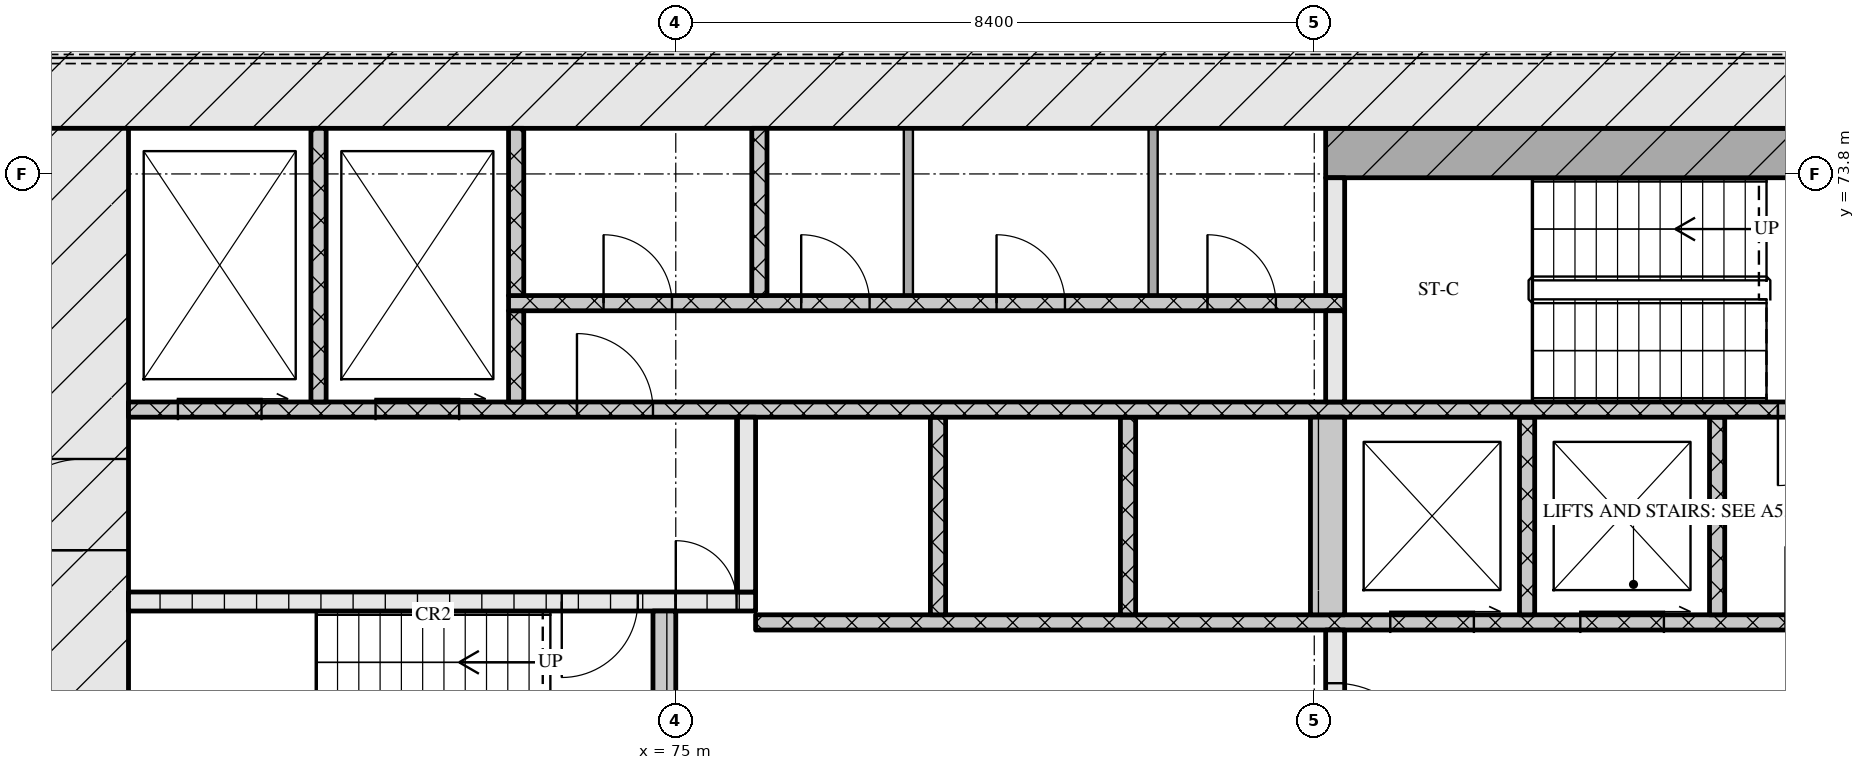
"""IFC4 building model, lengths in metres.
Left out: names, types, materials, properties, quantities, classifications, styles, units other than length and angle.
Written with IfcOpenShell. Run it as: python <this file> out.ifc"""

import sys

from ifc_helpers import new_model, si_unit, direction, frame, frame_2d, origin, place, context, subcontext, project, spatial, rectangle, extrude, element, fill, save


model = new_model("IFC4")
c1 = context("Model", 3, precision=1e-05, world=origin(), true_north=direction((0.0, 1.0)))
c2 = subcontext(c1, "Body", "Model", "MODEL_VIEW")
j1 = project(units=[si_unit("LENGTHUNIT", "METRE"), si_unit("PLANEANGLEUNIT", "RADIAN")], contexts=[c1])
p1 = place(None, origin())
s1 = spatial("IfcSite", under=j1, at=p1, CompositionType="ELEMENT")
p2 = place(p1, origin())
s2 = spatial("IfcBuilding", under=s1, at=p2, CompositionType="ELEMENT")
p3 = place(p2, frame((0.0, 0.0, 28.2)))
s3 = spatial("IfcBuildingStorey", under=s2, at=p3, CompositionType="ELEMENT", Elevation=28.2)
p4 = place(p3, frame((66.6, 75.0, 0.0), z_axis=(0.0, 0.0, 1.0), x_axis=(1.0, 0.0, 0.0)))
e1 = element("IfcWall", 1, at=p4, inside=s3, PredefinedType="SOLIDWALL", context=c2, shape_type="SweptSolid", body=[
    extrude(rectangle(XDim=42.0, YDim=1.2, at=frame_2d((21.0, 0.0))), origin(), (0.0, 0.0, 1.0), 4.2),
])
p5 = place(p3, frame((67.2, 62.4, 0.0), z_axis=(0.0, 0.0, 1.0), x_axis=(0.0, 1.0, 0.0)))
e2 = element("IfcWall", 2, at=p5, inside=s3, PredefinedType="SOLIDWALL", context=c2, shape_type="SweptSolid", body=[
    extrude(rectangle(XDim=12.0, YDim=1.2, at=frame_2d((6.0, 0.0))), origin(), (0.0, 0.0, 1.0), 4.2),
])
p6 = place(p5, frame((6.45, 0.0, 0.0)))
e3 = element("IfcOpeningElement", 3, at=p6, cuts=e2, PredefinedType="OPENING", context=c2, shape_type="SweptSolid", body=[
    extrude(rectangle(XDim=1.2, YDim=2.1, at=frame_2d((0.6, 1.05))), frame((0.0, 0.61, 0.0), z_axis=(0.0, -1.0, 0.0), x_axis=(1.0, 0.0, 0.0)), (0.0, 0.0, 1.0), 1.22),
])
p7 = place(p3, frame((74.85, 65.2, 0.0), z_axis=(0.0, 0.0, 1.0), x_axis=(0.0, 1.0, 0.0)))
e4 = element("IfcWall", 4, at=p7, inside=s3, PredefinedType="SOLIDWALL", context=c2, shape_type="SweptSolid", body=[
    extrude(rectangle(XDim=2.85, YDim=0.3, at=frame_2d((1.425, 0.0))), origin(), (0.0, 0.0, 1.0), 4.2),
])
p8 = place(p3, frame((83.675, 65.2, 0.0), z_axis=(0.0, 0.0, 1.0), x_axis=(0.0, 1.0, 0.0)))
e5 = element("IfcWall", 5, at=p8, inside=s3, PredefinedType="SOLIDWALL", context=c2, shape_type="SweptSolid", body=[
    extrude(rectangle(XDim=2.6, YDim=0.25, at=frame_2d((1.3, 0.0))), origin(), (0.0, 0.0, 1.0), 4.2),
])
p9 = place(p8, frame((0.7, 0.0, 0.0)))
e6 = element("IfcOpeningElement", 6, at=p9, cuts=e5, PredefinedType="OPENING", context=c2, shape_type="SweptSolid", body=[
    extrude(rectangle(XDim=1.2, YDim=2.1, at=frame_2d((0.6, 1.05))), frame((0.0, 0.135, 0.0), z_axis=(0.0, -1.0, 0.0), x_axis=(1.0, 0.0, 0.0)), (0.0, 0.0, 1.0), 0.27),
])
p10 = place(p3, frame((76.05, 67.9, 0.0), z_axis=(0.0, 0.0, 1.0), x_axis=(1.0, 0.0, 0.0)))
e7 = element("IfcWall", 7, at=p10, inside=s3, PredefinedType="SOLIDWALL", context=c2, shape_type="SweptSolid", body=[
    extrude(rectangle(XDim=23.1, YDim=0.2, at=frame_2d((11.55, 0.0))), origin(), (0.0, 0.0, 1.0), 4.2),
])
p11 = place(p10, frame((8.35, 0.0, 0.0)))
e8 = element("IfcOpeningElement", 8, at=p11, cuts=e7, PredefinedType="OPENING", context=c2, shape_type="SweptSolid", body=[
    extrude(rectangle(XDim=1.1, YDim=2.1, at=frame_2d((0.55, 1.05))), frame((0.0, 0.11, 0.0), z_axis=(0.0, -1.0, 0.0), x_axis=(1.0, 0.0, 0.0)), (0.0, 0.0, 1.0), 0.22),
])
p12 = place(p10, frame((10.85, 0.0, 0.0)))
e9 = element("IfcOpeningElement", 9, at=p12, cuts=e7, PredefinedType="OPENING", context=c2, shape_type="SweptSolid", body=[
    extrude(rectangle(XDim=1.1, YDim=2.1, at=frame_2d((0.55, 1.05))), frame((0.0, 0.11, 0.0), z_axis=(0.0, -1.0, 0.0), x_axis=(1.0, 0.0, 0.0)), (0.0, 0.0, 1.0), 0.22),
])
p13 = place(p10, frame((13.55, 0.0, 0.0)))
e10 = element("IfcOpeningElement", 10, at=p13, cuts=e7, PredefinedType="OPENING", context=c2, shape_type="SweptSolid", body=[
    extrude(rectangle(XDim=1.0, YDim=2.1, at=frame_2d((0.5, 1.05))), frame((0.0, 0.11, 0.0), z_axis=(0.0, -1.0, 0.0), x_axis=(1.0, 0.0, 0.0)), (0.0, 0.0, 1.0), 0.22),
])
for number, where, z_axis, x_axis in (
    (11, (78.45, 68.0, 0.0), (0.0, 0.0, 1.0), (0.0, 1.0, 0.0)),
    (12, (80.95, 68.0, 0.0), (0.0, 0.0, 1.0), (0.0, 1.0, 0.0)),
):
    element("IfcWall", number, at=place(p3, frame(where, z_axis=z_axis, x_axis=x_axis)), inside=s3, PredefinedType="SOLIDWALL", context=c2, shape_type="SweptSolid", body=[
        extrude(rectangle(XDim=2.6, YDim=0.2, at=frame_2d((1.3, 0.0))), origin(), (0.0, 0.0, 1.0), 4.2),
    ])
p14 = place(p3, frame((83.575, 68.0, 0.0), z_axis=(0.0, 0.0, 1.0), x_axis=(0.0, 1.0, 0.0)))
e13 = element("IfcWall", 13, at=p14, inside=s3, PredefinedType="SOLIDWALL", context=c2, shape_type="SweptSolid", body=[
    extrude(rectangle(XDim=2.6, YDim=0.45, at=frame_2d((1.3, 0.0))), origin(), (0.0, 0.0, 1.0), 4.2),
])
for number, where, z_axis, x_axis in (
    (14, (86.2, 68.0, 0.0), (0.0, 0.0, 1.0), (0.0, 1.0, 0.0)),
    (15, (88.7, 68.0, 0.0), (0.0, 0.0, 1.0), (0.0, 1.0, 0.0)),
):
    element("IfcWall", number, at=place(p3, frame(where, z_axis=z_axis, x_axis=x_axis)), inside=s3, PredefinedType="SOLIDWALL", context=c2, shape_type="SweptSolid", body=[
        extrude(rectangle(XDim=2.6, YDim=0.2, at=frame_2d((1.3, 0.0))), origin(), (0.0, 0.0, 1.0), 4.2),
    ])
p15 = place(p3, frame((67.8, 68.175, 0.0), z_axis=(0.0, 0.0, 1.0), x_axis=(1.0, 0.0, 0.0)))
e16 = element("IfcWall", 16, at=p15, inside=s3, PredefinedType="SOLIDWALL", context=c2, shape_type="SweptSolid", body=[
    extrude(rectangle(XDim=8.25, YDim=0.25, at=frame_2d((4.125, 0.0))), origin(), (0.0, 0.0, 1.0), 4.2),
])
p16 = place(p15, frame((5.7, 0.0, 0.0)))
e17 = element("IfcOpeningElement", 17, at=p16, cuts=e16, PredefinedType="OPENING", context=c2, shape_type="SweptSolid", body=[
    extrude(rectangle(XDim=1.0, YDim=2.1, at=frame_2d((0.5, 1.05))), frame((0.0, 0.135, 0.0), z_axis=(0.0, -1.0, 0.0), x_axis=(1.0, 0.0, 0.0)), (0.0, 0.0, 1.0), 0.27),
])
p17 = place(p15, frame((7.2, 0.0, 0.0)))
e18 = element("IfcOpeningElement", 18, at=p17, cuts=e16, PredefinedType="OPENING", context=c2, shape_type="SweptSolid", body=[
    extrude(rectangle(XDim=0.8, YDim=2.1, at=frame_2d((0.4, 1.05))), frame((0.0, 0.135, 0.0), z_axis=(0.0, -1.0, 0.0), x_axis=(1.0, 0.0, 0.0)), (0.0, 0.0, 1.0), 0.27),
])
p18 = place(p3, frame((75.925, 68.3, 0.0), z_axis=(0.0, 0.0, 1.0), x_axis=(0.0, 1.0, 0.0)))
e19 = element("IfcWall", 19, at=p18, inside=s3, PredefinedType="SOLIDWALL", context=c2, shape_type="SweptSolid", body=[
    extrude(rectangle(XDim=2.3, YDim=0.25, at=frame_2d((1.15, 0.0))), origin(), (0.0, 0.0, 1.0), 4.2),
])
p19 = place(p3, frame((67.8, 70.7, 0.0), z_axis=(0.0, 0.0, 1.0), x_axis=(1.0, 0.0, 0.0)))
e20 = element("IfcWall", 20, at=p19, inside=s3, PredefinedType="SOLIDWALL", context=c2, shape_type="SweptSolid", body=[
    extrude(rectangle(XDim=39.6, YDim=0.2, at=frame_2d((19.8, 0.0))), origin(), (0.0, 0.0, 1.0), 4.2),
])
p20 = place(p19, frame((0.65, 0.0, 0.0)))
e21 = element("IfcOpeningElement", 21, at=p20, cuts=e20, PredefinedType="OPENING", context=c2, shape_type="SweptSolid", body=[
    extrude(rectangle(XDim=1.1, YDim=2.1, at=frame_2d((0.55, 1.05))), frame((0.0, 0.11, 0.0), z_axis=(0.0, -1.0, 0.0), x_axis=(1.0, 0.0, 0.0)), (0.0, 0.0, 1.0), 0.22),
])
p21 = place(p19, frame((3.25, 0.0, 0.0)))
e22 = element("IfcOpeningElement", 22, at=p21, cuts=e20, PredefinedType="OPENING", context=c2, shape_type="SweptSolid", body=[
    extrude(rectangle(XDim=1.1, YDim=2.1, at=frame_2d((0.55, 1.05))), frame((0.0, 0.11, 0.0), z_axis=(0.0, -1.0, 0.0), x_axis=(1.0, 0.0, 0.0)), (0.0, 0.0, 1.0), 0.22),
])
p22 = place(p19, frame((5.9, 0.0, 0.0)))
e23 = element("IfcOpeningElement", 23, at=p22, cuts=e20, PredefinedType="OPENING", context=c2, shape_type="SweptSolid", body=[
    extrude(rectangle(XDim=1.0, YDim=2.1, at=frame_2d((0.5, 1.05))), frame((0.0, 0.11, 0.0), z_axis=(0.0, -1.0, 0.0), x_axis=(1.0, 0.0, 0.0)), (0.0, 0.0, 1.0), 0.22),
])
p23 = place(p19, frame((21.7, 0.0, 0.0)))
e24 = element("IfcOpeningElement", 24, at=p23, cuts=e20, PredefinedType="OPENING", context=c2, shape_type="SweptSolid", body=[
    extrude(rectangle(XDim=1.0, YDim=2.1, at=frame_2d((0.5, 1.05))), frame((0.0, 0.11, 0.0), z_axis=(0.0, -1.0, 0.0), x_axis=(1.0, 0.0, 0.0)), (0.0, 0.0, 1.0), 0.22),
])
p24 = place(p19, frame((32.7, 0.0, 0.0)))
e25 = element("IfcOpeningElement", 25, at=p24, cuts=e20, PredefinedType="OPENING", context=c2, shape_type="SweptSolid", body=[
    extrude(rectangle(XDim=1.0, YDim=2.1, at=frame_2d((0.5, 1.05))), frame((0.0, 0.11, 0.0), z_axis=(0.0, -1.0, 0.0), x_axis=(1.0, 0.0, 0.0)), (0.0, 0.0, 1.0), 0.22),
])
p25 = place(p19, frame((35.25, 0.0, 0.0)))
e26 = element("IfcOpeningElement", 26, at=p25, cuts=e20, PredefinedType="OPENING", context=c2, shape_type="SweptSolid", body=[
    extrude(rectangle(XDim=1.1, YDim=2.1, at=frame_2d((0.55, 1.05))), frame((0.0, 0.11, 0.0), z_axis=(0.0, -1.0, 0.0), x_axis=(1.0, 0.0, 0.0)), (0.0, 0.0, 1.0), 0.22),
])
p26 = place(p19, frame((37.85, 0.0, 0.0)))
e27 = element("IfcOpeningElement", 27, at=p26, cuts=e20, PredefinedType="OPENING", context=c2, shape_type="SweptSolid", body=[
    extrude(rectangle(XDim=1.1, YDim=2.1, at=frame_2d((0.55, 1.05))), frame((0.0, 0.11, 0.0), z_axis=(0.0, -1.0, 0.0), x_axis=(1.0, 0.0, 0.0)), (0.0, 0.0, 1.0), 0.22),
])
p27 = place(p3, frame((70.3, 70.8, 0.0), z_axis=(0.0, 0.0, 1.0), x_axis=(0.0, 1.0, 0.0)))
e28 = element("IfcWall", 28, at=p27, inside=s3, PredefinedType="SOLIDWALL", context=c2, shape_type="SweptSolid", body=[
    extrude(rectangle(XDim=3.6, YDim=0.2, at=frame_2d((1.8, 0.0))), origin(), (0.0, 0.0, 1.0), 4.2),
])
p28 = place(p3, frame((72.9, 70.8, 0.0), z_axis=(0.0, 0.0, 1.0), x_axis=(0.0, 1.0, 0.0)))
e29 = element("IfcWall", 29, at=p28, inside=s3, PredefinedType="SOLIDWALL", context=c2, shape_type="SweptSolid", body=[
    extrude(rectangle(XDim=1.2, YDim=0.2, at=frame_2d((0.6, 0.0))), origin(), (0.0, 0.0, 1.0), 4.2),
])
p29 = place(p3, frame((83.675, 70.8, 0.0), z_axis=(0.0, 0.0, 1.0), x_axis=(0.0, 1.0, 0.0)))
e30 = element("IfcWall", 30, at=p29, inside=s3, PredefinedType="SOLIDWALL", context=c2, shape_type="SweptSolid", body=[
    extrude(rectangle(XDim=1.2, YDim=0.25, at=frame_2d((0.6, 0.0))), origin(), (0.0, 0.0, 1.0), 4.2),
])
p30 = place(p3, frame((72.8, 72.1, 0.0), z_axis=(0.0, 0.0, 1.0), x_axis=(1.0, 0.0, 0.0)))
e31 = element("IfcWall", 31, at=p30, inside=s3, PredefinedType="SOLIDWALL", context=c2, shape_type="SweptSolid", body=[
    extrude(rectangle(XDim=11.0, YDim=0.2, at=frame_2d((5.5, 0.0))), origin(), (0.0, 0.0, 1.0), 4.2),
])
p31 = place(p30, frame((1.25, 0.0, 0.0)))
e32 = element("IfcOpeningElement", 32, at=p31, cuts=e31, PredefinedType="OPENING", context=c2, shape_type="SweptSolid", body=[
    extrude(rectangle(XDim=0.9, YDim=2.1, at=frame_2d((0.45, 1.05))), frame((0.0, 0.11, 0.0), z_axis=(0.0, -1.0, 0.0), x_axis=(1.0, 0.0, 0.0)), (0.0, 0.0, 1.0), 0.22),
])
p32 = place(p30, frame((3.85, 0.0, 0.0)))
e33 = element("IfcOpeningElement", 33, at=p32, cuts=e31, PredefinedType="OPENING", context=c2, shape_type="SweptSolid", body=[
    extrude(rectangle(XDim=0.9, YDim=2.1, at=frame_2d((0.45, 1.05))), frame((0.0, 0.11, 0.0), z_axis=(0.0, -1.0, 0.0), x_axis=(1.0, 0.0, 0.0)), (0.0, 0.0, 1.0), 0.22),
])
p33 = place(p30, frame((6.42, 0.0, 0.0)))
e34 = element("IfcOpeningElement", 34, at=p33, cuts=e31, PredefinedType="OPENING", context=c2, shape_type="SweptSolid", body=[
    extrude(rectangle(XDim=0.9, YDim=2.1, at=frame_2d((0.45, 1.05))), frame((0.0, 0.11, 0.0), z_axis=(0.0, -1.0, 0.0), x_axis=(1.0, 0.0, 0.0)), (0.0, 0.0, 1.0), 0.22),
])
p34 = place(p30, frame((9.195, 0.0, 0.0)))
e35 = element("IfcOpeningElement", 35, at=p34, cuts=e31, PredefinedType="OPENING", context=c2, shape_type="SweptSolid", body=[
    extrude(rectangle(XDim=0.9, YDim=2.1, at=frame_2d((0.45, 1.05))), frame((0.0, 0.11, 0.0), z_axis=(0.0, -1.0, 0.0), x_axis=(1.0, 0.0, 0.0)), (0.0, 0.0, 1.0), 0.22),
])
for number, where, z_axis, x_axis in (
    (36, (72.9, 72.2, 0.0), (0.0, 0.0, 1.0), (0.0, 1.0, 0.0)),
    (37, (76.1, 72.2, 0.0), (0.0, 0.0, 1.0), (0.0, 1.0, 0.0)),
):
    element("IfcWall", number, at=place(p3, frame(where, z_axis=z_axis, x_axis=x_axis)), inside=s3, PredefinedType="SOLIDWALL", context=c2, shape_type="SweptSolid", body=[
        extrude(rectangle(XDim=2.2, YDim=0.2, at=frame_2d((1.1, 0.0))), origin(), (0.0, 0.0, 1.0), 4.2),
    ])
for number, where, z_axis, x_axis in (
    (38, (78.06, 72.2, 0.0), (0.0, 0.0, 1.0), (0.0, 1.0, 0.0)),
    (39, (81.28, 72.2, 0.0), (0.0, 0.0, 1.0), (0.0, 1.0, 0.0)),
):
    element("IfcWall", number, at=place(p3, frame(where, z_axis=z_axis, x_axis=x_axis)), inside=s3, PredefinedType="PARTITIONING", context=c2, shape_type="SweptSolid", body=[
        extrude(rectangle(XDim=2.2, YDim=0.12, at=frame_2d((1.1, 0.0))), origin(), (0.0, 0.0, 1.0), 4.2),
    ])
p35 = place(p3, frame((83.675, 72.2, 0.0), z_axis=(0.0, 0.0, 1.0), x_axis=(0.0, 1.0, 0.0)))
e40 = element("IfcWall", 40, at=p35, inside=s3, PredefinedType="SOLIDWALL", context=c2, shape_type="SweptSolid", body=[
    extrude(rectangle(XDim=1.55, YDim=0.25, at=frame_2d((0.775, 0.0))), origin(), (0.0, 0.0, 1.0), 4.2),
])
p36 = place(p3, frame((83.55, 74.075, 0.0), z_axis=(0.0, 0.0, 1.0), x_axis=(1.0, 0.0, 0.0)))
e41 = element("IfcWall", 41, at=p36, inside=s3, PredefinedType="SOLIDWALL", context=c2, shape_type="SweptSolid", body=[
    extrude(rectangle(XDim=8.1, YDim=0.65, at=frame_2d((4.05, 0.0))), origin(), (0.0, 0.0, 1.0), 4.2),
])
p37 = place(p9, origin())
e42 = element("IfcDoor", 42, at=p37, inside=s3, OperationType="SINGLE_SWING_RIGHT", PredefinedType="DOOR", context=c2, shape_type="SweptSolid", body=[
    extrude(rectangle(XDim=1.2, YDim=2.1, at=frame_2d((0.6, 1.05))), frame((0.0, 0.025, 0.0), z_axis=(0.0, -1.0, 0.0), x_axis=(1.0, 0.0, 0.0)), (0.0, 0.0, 1.0), 0.05),
])
fill(e6, e42)
p38 = place(p11, origin())
e43 = element("IfcDoor", 43, at=p38, inside=s3, OperationType="SLIDING_TO_RIGHT", PredefinedType="DOOR", context=c2, shape_type="SweptSolid", body=[
    extrude(rectangle(XDim=1.1, YDim=2.1, at=frame_2d((0.55, 1.05))), frame((0.0, 0.025, 0.0), z_axis=(0.0, -1.0, 0.0), x_axis=(1.0, 0.0, 0.0)), (0.0, 0.0, 1.0), 0.05),
])
fill(e8, e43)
p39 = place(p12, origin())
e44 = element("IfcDoor", 44, at=p39, inside=s3, OperationType="SLIDING_TO_RIGHT", PredefinedType="DOOR", context=c2, shape_type="SweptSolid", body=[
    extrude(rectangle(XDim=1.1, YDim=2.1, at=frame_2d((0.55, 1.05))), frame((0.0, 0.025, 0.0), z_axis=(0.0, -1.0, 0.0), x_axis=(1.0, 0.0, 0.0)), (0.0, 0.0, 1.0), 0.05),
])
fill(e9, e44)
p40 = place(p16, origin())
e45 = element("IfcDoor", 45, at=p40, inside=s3, OperationType="SINGLE_SWING_RIGHT", PredefinedType="DOOR", context=c2, shape_type="SweptSolid", body=[
    extrude(rectangle(XDim=1.0, YDim=2.1, at=frame_2d((0.5, 1.05))), frame((0.0, 0.025, 0.0), z_axis=(0.0, -1.0, 0.0), x_axis=(1.0, 0.0, 0.0)), (0.0, 0.0, 1.0), 0.05),
])
fill(e17, e45)
p41 = place(p17, origin())
e46 = element("IfcDoor", 46, at=p41, inside=s3, OperationType="SINGLE_SWING_LEFT", PredefinedType="DOOR", context=c2, shape_type="SweptSolid", body=[
    extrude(rectangle(XDim=0.8, YDim=2.1, at=frame_2d((0.4, 1.05))), frame((0.0, 0.025, 0.0), z_axis=(0.0, -1.0, 0.0), x_axis=(1.0, 0.0, 0.0)), (0.0, 0.0, 1.0), 0.05),
])
fill(e18, e46)
p42 = place(p6, origin())
e47 = element("IfcDoor", 47, at=p42, inside=s3, OperationType="SINGLE_SWING_LEFT", PredefinedType="DOOR", context=c2, shape_type="SweptSolid", body=[
    extrude(rectangle(XDim=1.2, YDim=2.1, at=frame_2d((0.6, 1.05))), frame((0.0, 0.025, 0.0), z_axis=(0.0, -1.0, 0.0), x_axis=(1.0, 0.0, 0.0)), (0.0, 0.0, 1.0), 0.05),
])
fill(e3, e47)
p43 = place(p20, origin())
e48 = element("IfcDoor", 48, at=p43, inside=s3, OperationType="SLIDING_TO_RIGHT", PredefinedType="DOOR", context=c2, shape_type="SweptSolid", body=[
    extrude(rectangle(XDim=1.1, YDim=2.1, at=frame_2d((0.55, 1.05))), frame((0.0, 0.025, 0.0), z_axis=(0.0, -1.0, 0.0), x_axis=(1.0, 0.0, 0.0)), (0.0, 0.0, 1.0), 0.05),
])
fill(e21, e48)
p44 = place(p21, origin())
e49 = element("IfcDoor", 49, at=p44, inside=s3, OperationType="SLIDING_TO_RIGHT", PredefinedType="DOOR", context=c2, shape_type="SweptSolid", body=[
    extrude(rectangle(XDim=1.1, YDim=2.1, at=frame_2d((0.55, 1.05))), frame((0.0, 0.025, 0.0), z_axis=(0.0, -1.0, 0.0), x_axis=(1.0, 0.0, 0.0)), (0.0, 0.0, 1.0), 0.05),
])
fill(e22, e49)
p45 = place(p22, origin())
e50 = element("IfcDoor", 50, at=p45, inside=s3, OperationType="SINGLE_SWING_LEFT", PredefinedType="DOOR", context=c2, shape_type="SweptSolid", body=[
    extrude(rectangle(XDim=1.0, YDim=2.1, at=frame_2d((0.5, 1.05))), frame((0.0, 0.025, 0.0), z_axis=(0.0, -1.0, 0.0), x_axis=(1.0, 0.0, 0.0)), (0.0, 0.0, 1.0), 0.05),
])
fill(e23, e50)
p46 = place(p23, origin())
e51 = element("IfcDoor", 51, at=p46, inside=s3, OperationType="SINGLE_SWING_RIGHT", PredefinedType="DOOR", context=c2, shape_type="SweptSolid", body=[
    extrude(rectangle(XDim=1.0, YDim=2.1, at=frame_2d((0.5, 1.05))), frame((0.0, 0.025, 0.0), z_axis=(0.0, -1.0, 0.0), x_axis=(1.0, 0.0, 0.0)), (0.0, 0.0, 1.0), 0.05),
])
fill(e24, e51)
p47 = place(p31, origin())
e52 = element("IfcDoor", 52, at=p47, inside=s3, OperationType="SINGLE_SWING_LEFT", PredefinedType="DOOR", context=c2, shape_type="SweptSolid", body=[
    extrude(rectangle(XDim=0.9, YDim=2.1, at=frame_2d((0.45, 1.05))), frame((0.0, 0.025, 0.0), z_axis=(0.0, -1.0, 0.0), x_axis=(1.0, 0.0, 0.0)), (0.0, 0.0, 1.0), 0.05),
])
fill(e32, e52)
p48 = place(p32, origin())
e53 = element("IfcDoor", 53, at=p48, inside=s3, OperationType="SINGLE_SWING_LEFT", PredefinedType="DOOR", context=c2, shape_type="SweptSolid", body=[
    extrude(rectangle(XDim=0.9, YDim=2.1, at=frame_2d((0.45, 1.05))), frame((0.0, 0.025, 0.0), z_axis=(0.0, -1.0, 0.0), x_axis=(1.0, 0.0, 0.0)), (0.0, 0.0, 1.0), 0.05),
])
fill(e33, e53)
p49 = place(p33, origin())
e54 = element("IfcDoor", 54, at=p49, inside=s3, OperationType="SINGLE_SWING_LEFT", PredefinedType="DOOR", context=c2, shape_type="SweptSolid", body=[
    extrude(rectangle(XDim=0.9, YDim=2.1, at=frame_2d((0.45, 1.05))), frame((0.0, 0.025, 0.0), z_axis=(0.0, -1.0, 0.0), x_axis=(1.0, 0.0, 0.0)), (0.0, 0.0, 1.0), 0.05),
])
fill(e34, e54)
p50 = place(p34, origin())
e55 = element("IfcDoor", 55, at=p50, inside=s3, OperationType="SINGLE_SWING_LEFT", PredefinedType="DOOR", context=c2, shape_type="SweptSolid", body=[
    extrude(rectangle(XDim=0.9, YDim=2.1, at=frame_2d((0.45, 1.05))), frame((0.0, 0.025, 0.0), z_axis=(0.0, -1.0, 0.0), x_axis=(1.0, 0.0, 0.0)), (0.0, 0.0, 1.0), 0.05),
])
fill(e35, e55)
save(model, sys.argv[1])
